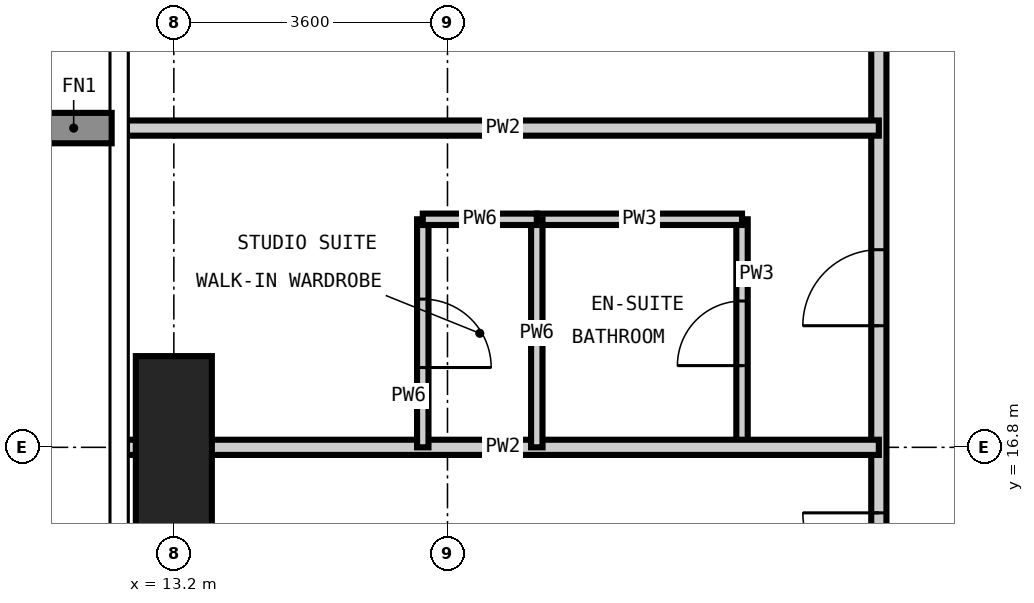
"""IFC4 building model, lengths in metres.
Left out: names, types, materials, properties, quantities, classifications, styles, units other than length and angle.
Written with IfcOpenShell. Run it as: python <this file> out.ifc"""

import sys

from ifc_helpers import new_model, si_unit, direction, frame, frame_2d, origin, origin_2d, place, context, subcontext, project, spatial, rectangle, extrude, element, fill, save


model = new_model("IFC4")
c1 = context("Model", 3, precision=1e-05, world=origin(), true_north=direction((0.0, 1.0)))
c2 = subcontext(c1, "Body", "Model", "MODEL_VIEW")
j1 = project(units=[si_unit("LENGTHUNIT", "METRE"), si_unit("PLANEANGLEUNIT", "RADIAN")], contexts=[c1])
p1 = place(None, origin())
s1 = spatial("IfcSite", under=j1, at=p1, CompositionType="ELEMENT")
p2 = place(p1, origin())
s2 = spatial("IfcBuilding", under=s1, at=p2, CompositionType="ELEMENT")
p3 = place(p2, frame((0.0, 0.0, 264.6)))
s3 = spatial("IfcBuildingStorey", under=s2, at=p3, CompositionType="ELEMENT", Elevation=264.6)
p4 = place(p3, frame((13.2, 16.8, -0.35), z_axis=(0.0, 0.0, 1.0), x_axis=(1.0, 0.0, 0.0)))
e1 = element("IfcColumn", 1, at=p4, inside=s3, PredefinedType="COLUMN", context=c2, shape_type="SweptSolid", body=[
    extrude(rectangle(XDim=1.0, YDim=2.4, at=origin_2d()), origin(), (0.0, 0.0, 1.0), 3.9),
])
p5 = place(p3, frame((20.675, 16.8, 0.0), z_axis=(0.0, 0.0, 1.0), x_axis=(0.0, 1.0, 0.0)))
e2 = element("IfcWall", 2, at=p5, inside=s3, PredefinedType="PARTITIONING", context=c2, shape_type="SweptSolid", body=[
    extrude(rectangle(XDim=3.0, YDim=0.15, at=frame_2d((1.5, 0.0))), origin(), (0.0, 0.0, 1.0), 3.55),
])
p6 = place(p5, frame((1.075, 0.0, 0.0)))
e3 = element("IfcOpeningElement", 3, at=p6, cuts=e2, PredefinedType="OPENING", context=c2, shape_type="SweptSolid", body=[
    extrude(rectangle(XDim=0.85, YDim=2.1, at=frame_2d((0.425, 1.05))), frame((0.0, 0.085, 0.0), z_axis=(0.0, -1.0, 0.0), x_axis=(1.0, 0.0, 0.0)), (0.0, 0.0, 1.0), 0.17),
])
p7 = place(p3, frame((17.975, 19.8, 0.0), z_axis=(0.0, 0.0, 1.0), x_axis=(1.0, 0.0, 0.0)))
e4 = element("IfcWall", 4, at=p7, inside=s3, PredefinedType="PARTITIONING", context=c2, shape_type="SweptSolid", body=[
    extrude(rectangle(XDim=2.7, YDim=0.15, at=frame_2d((1.35, 0.0))), origin(), (0.0, 0.0, 1.0), 3.55),
])
p8 = place(p3, frame((22.475, 14.075, 0.0), z_axis=(0.0, 0.0, 1.0), x_axis=(0.0, 1.0, 0.0)))
e5 = element("IfcWall", 5, at=p8, inside=s3, PredefinedType="PARTITIONING", context=c2, shape_type="SweptSolid", body=[
    extrude(rectangle(XDim=30.05, YDim=0.2, at=frame_2d((15.025, 0.0))), origin(), (0.0, 0.0, 1.0), 3.55),
])
p9 = place(p8, frame((4.325, 0.0, 0.0)))
e6 = element("IfcOpeningElement", 6, at=p9, cuts=e5, PredefinedType="OPENING", context=c2, shape_type="SweptSolid", body=[
    extrude(rectangle(XDim=1.0, YDim=2.2, at=frame_2d((0.5, 1.1))), frame((0.0, 0.11, 0.0), z_axis=(0.0, -1.0, 0.0), x_axis=(1.0, 0.0, 0.0)), (0.0, 0.0, 1.0), 0.22),
])
p10 = place(p8, frame((8.525, 0.0, 0.0)))
e7 = element("IfcOpeningElement", 7, at=p10, cuts=e5, PredefinedType="OPENING", context=c2, shape_type="SweptSolid", body=[
    extrude(rectangle(XDim=1.0, YDim=2.2, at=frame_2d((0.5, 1.1))), frame((0.0, 0.11, 0.0), z_axis=(0.0, -1.0, 0.0), x_axis=(1.0, 0.0, 0.0)), (0.0, 0.0, 1.0), 0.22),
])
p11 = place(p8, frame((13.625, 0.0, 0.0)))
e8 = element("IfcOpeningElement", 8, at=p11, cuts=e5, PredefinedType="OPENING", context=c2, shape_type="SweptSolid", body=[
    extrude(rectangle(XDim=1.0, YDim=2.2, at=frame_2d((0.5, 1.1))), frame((0.0, 0.11, 0.0), z_axis=(0.0, -1.0, 0.0), x_axis=(1.0, 0.0, 0.0)), (0.0, 0.0, 1.0), 0.22),
])
p12 = place(p8, frame((25.325, 0.0, 0.0)))
e9 = element("IfcOpeningElement", 9, at=p12, cuts=e5, PredefinedType="OPENING", context=c2, shape_type="SweptSolid", body=[
    extrude(rectangle(XDim=1.0, YDim=2.2, at=frame_2d((0.5, 1.1))), frame((0.0, 0.11, 0.0), z_axis=(0.0, -1.0, 0.0), x_axis=(1.0, 0.0, 0.0)), (0.0, 0.0, 1.0), 0.22),
])
p13 = place(p8, frame((0.863, 0.0, 0.0)))
e10 = element("IfcOpeningElement", 10, at=p13, cuts=e5, PredefinedType="OPENING", context=c2, shape_type="SweptSolid", body=[
    extrude(rectangle(XDim=1.0, YDim=2.2, at=frame_2d((0.5, 1.1))), frame((0.0, 0.11, 0.0), z_axis=(0.0, -1.0, 0.0), x_axis=(1.0, 0.0, 0.0)), (0.0, 0.0, 1.0), 0.22),
])
p14 = place(p8, frame((28.487, 0.0, 0.0)))
e11 = element("IfcOpeningElement", 11, at=p14, cuts=e5, PredefinedType="OPENING", context=c2, shape_type="SweptSolid", body=[
    extrude(rectangle(XDim=1.0, YDim=2.2, at=frame_2d((0.5, 1.1))), frame((0.0, 0.11, 0.0), z_axis=(0.0, -1.0, 0.0), x_axis=(1.0, 0.0, 0.0)), (0.0, 0.0, 1.0), 0.22),
])
for number, where, z_axis, x_axis in (
    (12, (12.582, 16.8, 0.0), (0.0, 0.0, 1.0), (1.0, 0.0, 0.0)),
    (13, (12.582, 21.0, 0.0), (0.0, 0.0, 1.0), (1.0, 0.0, 0.0)),
):
    element("IfcWall", number, at=place(p3, frame(where, z_axis=z_axis, x_axis=x_axis)), inside=s3, PredefinedType="PARTITIONING", context=c2, shape_type="SweptSolid", body=[
        extrude(rectangle(XDim=9.893, YDim=0.2, at=frame_2d((4.947, 0.0))), origin(), (0.0, 0.0, 1.0), 3.55),
    ])
p15 = place(p3, frame((16.475, 16.8, 0.0), z_axis=(0.0, 0.0, 1.0), x_axis=(0.0, 1.0, 0.0)))
e14 = element("IfcWall", 14, at=p15, inside=s3, PredefinedType="PARTITIONING", context=c2, shape_type="SweptSolid", body=[
    extrude(rectangle(XDim=3.0, YDim=0.15, at=frame_2d((1.5, 0.0))), origin(), (0.0, 0.0, 1.0), 3.55),
])
p16 = place(p15, frame((1.05, 0.0, 0.0)))
e15 = element("IfcOpeningElement", 15, at=p16, cuts=e14, PredefinedType="OPENING", context=c2, shape_type="SweptSolid", body=[
    extrude(rectangle(XDim=0.9, YDim=2.1, at=frame_2d((0.45, 1.05))), frame((0.0, 0.085, 0.0), z_axis=(0.0, -1.0, 0.0), x_axis=(1.0, 0.0, 0.0)), (0.0, 0.0, 1.0), 0.17),
])
p17 = place(p3, frame((17.975, 16.8, 0.0), z_axis=(0.0, 0.0, 1.0), x_axis=(0.0, 1.0, 0.0)))
e16 = element("IfcWall", 16, at=p17, inside=s3, PredefinedType="PARTITIONING", context=c2, shape_type="SweptSolid", body=[
    extrude(rectangle(XDim=3.0, YDim=0.15, at=frame_2d((1.5, 0.0))), origin(), (0.0, 0.0, 1.0), 3.55),
])
p18 = place(p3, frame((16.475, 19.8, 0.0), z_axis=(0.0, 0.0, 1.0), x_axis=(1.0, 0.0, 0.0)))
e17 = element("IfcWall", 17, at=p18, inside=s3, PredefinedType="PARTITIONING", context=c2, shape_type="SweptSolid", body=[
    extrude(rectangle(XDim=1.5, YDim=0.15, at=frame_2d((0.75, 0.0))), origin(), (0.0, 0.0, 1.0), 3.55),
])
p19 = place(p9, origin())
e18 = element("IfcDoor", 18, at=p19, inside=s3, OperationType="SINGLE_SWING_LEFT", PredefinedType="DOOR", context=c2, shape_type="SweptSolid", body=[
    extrude(rectangle(XDim=1.0, YDim=2.2, at=frame_2d((0.5, 1.1))), frame((0.0, 0.025, 0.0), z_axis=(0.0, -1.0, 0.0), x_axis=(1.0, 0.0, 0.0)), (0.0, 0.0, 1.0), 0.05),
])
fill(e6, e18)
p20 = place(p6, origin())
e19 = element("IfcDoor", 19, at=p20, inside=s3, OperationType="SINGLE_SWING_LEFT", PredefinedType="DOOR", context=c2, shape_type="SweptSolid", body=[
    extrude(rectangle(XDim=0.85, YDim=2.1, at=frame_2d((0.425, 1.05))), frame((0.0, 0.025, 0.0), z_axis=(0.0, -1.0, 0.0), x_axis=(1.0, 0.0, 0.0)), (0.0, 0.0, 1.0), 0.05),
])
fill(e3, e19)
p21 = place(p16, frame((0.9, 0.0, 0.0), z_axis=(0.0, 0.0, 1.0), x_axis=(-1.0, 0.0, 0.0)))
e20 = element("IfcDoor", 20, at=p21, inside=s3, OperationType="SINGLE_SWING_RIGHT", PredefinedType="DOOR", context=c2, shape_type="SweptSolid", body=[
    extrude(rectangle(XDim=0.9, YDim=2.1, at=frame_2d((0.45, 1.05))), frame((0.0, 0.025, 0.0), z_axis=(0.0, -1.0, 0.0), x_axis=(1.0, 0.0, 0.0)), (0.0, 0.0, 1.0), 0.05),
])
fill(e15, e20)
p22 = place(p13, origin())
e21 = element("IfcDoor", 21, at=p22, inside=s3, OperationType="SINGLE_SWING_RIGHT", PredefinedType="DOOR", context=c2, shape_type="SweptSolid", body=[
    extrude(rectangle(XDim=1.0, YDim=2.2, at=frame_2d((0.5, 1.1))), frame((0.0, 0.025, 0.0), z_axis=(0.0, -1.0, 0.0), x_axis=(1.0, 0.0, 0.0)), (0.0, 0.0, 1.0), 0.05),
])
fill(e10, e21)
save(model, sys.argv[1])
